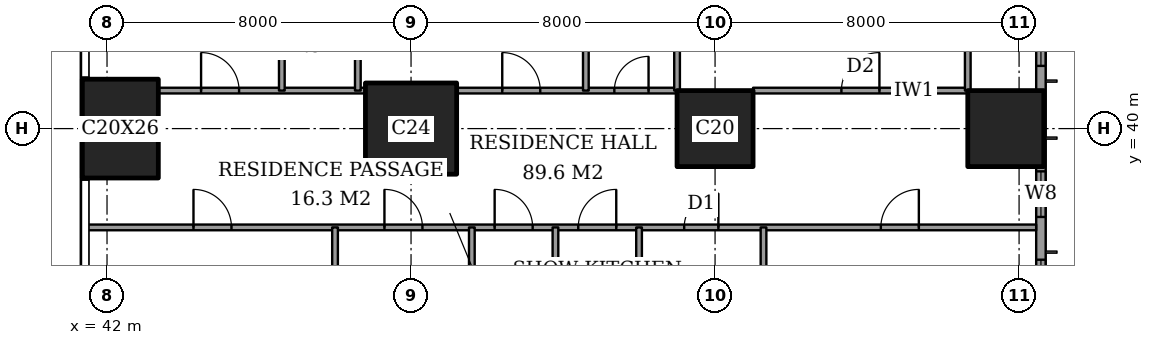
"""IFC4 building model, lengths in metres.
Left out: names, types, materials, properties, quantities, classifications, styles, units other than length and angle.
Written with IfcOpenShell. Run it as: python <this file> out.ifc"""

import sys

from ifc_helpers import new_model, si_unit, direction, frame, frame_2d, origin, origin_2d, place, context, subcontext, project, spatial, rectangle, extrude, element, fill, save


model = new_model("IFC4")
c1 = context("Model", 3, precision=1e-05, world=origin(), true_north=direction((0.0, 1.0)))
c2 = subcontext(c1, "Body", "Model", "MODEL_VIEW")
j1 = project(units=[si_unit("LENGTHUNIT", "METRE"), si_unit("PLANEANGLEUNIT", "RADIAN")], contexts=[c1])
p1 = place(None, origin())
s1 = spatial("IfcSite", under=j1, at=p1, CompositionType="ELEMENT")
p2 = place(p1, origin())
s2 = spatial("IfcBuilding", under=s1, at=p2, CompositionType="ELEMENT")
p3 = place(p2, frame((0.0, 0.0, 87.2)))
s3 = spatial("IfcBuildingStorey", under=s2, at=p3, CompositionType="ELEMENT", Elevation=87.2)
p4 = place(p3, frame((42.35, 40.0, 0.0), z_axis=(0.0, 0.0, 1.0), x_axis=(1.0, 0.0, 0.0)))
e1 = element("IfcColumn", 1, at=p4, inside=s3, PredefinedType="COLUMN", context=c2, shape_type="SweptSolid", body=[
    extrude(rectangle(XDim=2.0, YDim=2.6, at=origin_2d()), origin(), (0.0, 0.0, 1.0), 3.6),
])
p5 = place(p3, frame((50.0, 40.0, 0.0), z_axis=(0.0, 0.0, 1.0), x_axis=(1.0, 0.0, 0.0)))
e2 = element("IfcColumn", 2, at=p5, inside=s3, PredefinedType="COLUMN", context=c2, shape_type="SweptSolid", body=[
    extrude(rectangle(XDim=2.4, YDim=2.4, at=origin_2d()), origin(), (0.0, 0.0, 1.0), 3.6),
])
for number, where, z_axis, x_axis in (
    (3, (58.0, 40.0, 0.0), (0.0, 0.0, 1.0), (1.0, 0.0, 0.0)),
    (4, (65.65, 40.0, 0.0), (0.0, 0.0, 1.0), (1.0, 0.0, 0.0)),
):
    element("IfcColumn", number, at=place(p3, frame(where, z_axis=z_axis, x_axis=x_axis)), inside=s3, PredefinedType="COLUMN", context=c2, shape_type="SweptSolid", body=[
        extrude(rectangle(XDim=2.0, YDim=2.0, at=origin_2d()), origin(), (0.0, 0.0, 1.0), 3.6),
    ])
p6 = place(p3, frame((66.575, 3.175, 0.0), z_axis=(0.0, 0.0, 1.0), x_axis=(0.0, 1.0, 0.0)))
e5 = element("IfcWall", 5, at=p6, inside=s3, PredefinedType="SOLIDWALL", context=c2, shape_type="SweptSolid", body=[
    extrude(rectangle(XDim=41.65, YDim=0.25, at=frame_2d((20.825, 0.0))), origin(), (0.0, 0.0, 1.0), 3.6),
])
p7 = place(p6, frame((0.775, 0.0, 0.6)))
e6 = element("IfcOpeningElement", 6, at=p7, cuts=e5, PredefinedType="OPENING", context=c2, shape_type="SweptSolid", body=[
    extrude(rectangle(XDim=2.4, YDim=2.0, at=frame_2d((1.2, 1.0))), frame((0.0, 0.135, 0.0), z_axis=(0.0, -1.0, 0.0), x_axis=(1.0, 0.0, 0.0)), (0.0, 0.0, 1.0), 0.27),
])
p8 = place(p6, frame((6.1, 0.0, 0.6)))
e7 = element("IfcOpeningElement", 7, at=p8, cuts=e5, PredefinedType="OPENING", context=c2, shape_type="SweptSolid", body=[
    extrude(rectangle(XDim=1.2, YDim=2.0, at=frame_2d((0.6, 1.0))), frame((0.0, 0.135, 0.0), z_axis=(0.0, -1.0, 0.0), x_axis=(1.0, 0.0, 0.0)), (0.0, 0.0, 1.0), 0.27),
])
p9 = place(p6, frame((8.275, 0.0, 0.6)))
e8 = element("IfcOpeningElement", 8, at=p9, cuts=e5, PredefinedType="OPENING", context=c2, shape_type="SweptSolid", body=[
    extrude(rectangle(XDim=2.4, YDim=2.0, at=frame_2d((1.2, 1.0))), frame((0.0, 0.135, 0.0), z_axis=(0.0, -1.0, 0.0), x_axis=(1.0, 0.0, 0.0)), (0.0, 0.0, 1.0), 0.27),
])
p10 = place(p6, frame((15.775, 0.0, 0.6)))
e9 = element("IfcOpeningElement", 9, at=p10, cuts=e5, PredefinedType="OPENING", context=c2, shape_type="SweptSolid", body=[
    extrude(rectangle(XDim=2.4, YDim=2.0, at=frame_2d((1.2, 1.0))), frame((0.0, 0.135, 0.0), z_axis=(0.0, -1.0, 0.0), x_axis=(1.0, 0.0, 0.0)), (0.0, 0.0, 1.0), 0.27),
])
p11 = place(p6, frame((23.475, 0.0, 0.6)))
e10 = element("IfcOpeningElement", 10, at=p11, cuts=e5, PredefinedType="OPENING", context=c2, shape_type="SweptSolid", body=[
    extrude(rectangle(XDim=2.4, YDim=2.0, at=frame_2d((1.2, 1.0))), frame((0.0, 0.135, 0.0), z_axis=(0.0, -1.0, 0.0), x_axis=(1.0, 0.0, 0.0)), (0.0, 0.0, 1.0), 0.27),
])
p12 = place(p6, frame((30.975, 0.0, 0.6)))
e11 = element("IfcOpeningElement", 11, at=p12, cuts=e5, PredefinedType="OPENING", context=c2, shape_type="SweptSolid", body=[
    extrude(rectangle(XDim=2.4, YDim=2.0, at=frame_2d((1.2, 1.0))), frame((0.0, 0.135, 0.0), z_axis=(0.0, -1.0, 0.0), x_axis=(1.0, 0.0, 0.0)), (0.0, 0.0, 1.0), 0.27),
])
p13 = place(p6, frame((34.5, 0.0, 0.6)))
e12 = element("IfcOpeningElement", 12, at=p13, cuts=e5, PredefinedType="OPENING", context=c2, shape_type="SweptSolid", body=[
    extrude(rectangle(XDim=1.2, YDim=2.0, at=frame_2d((0.6, 1.0))), frame((0.0, 0.135, 0.0), z_axis=(0.0, -1.0, 0.0), x_axis=(1.0, 0.0, 0.0)), (0.0, 0.0, 1.0), 0.27),
])
p14 = place(p6, frame((38.475, 0.0, 0.6)))
e13 = element("IfcOpeningElement", 13, at=p14, cuts=e5, PredefinedType="OPENING", context=c2, shape_type="SweptSolid", body=[
    extrude(rectangle(XDim=2.4, YDim=2.0, at=frame_2d((1.2, 1.0))), frame((0.0, 0.135, 0.0), z_axis=(0.0, -1.0, 0.0), x_axis=(1.0, 0.0, 0.0)), (0.0, 0.0, 1.0), 0.27),
])
p15 = place(p3, frame((41.439, 37.4, 0.0), z_axis=(0.0, 0.0, 1.0), x_axis=(1.0, 0.0, 0.0)))
e14 = element("IfcWall", 14, at=p15, inside=s3, PredefinedType="PARTITIONING", context=c2, shape_type="SweptSolid", body=[
    extrude(rectangle(XDim=25.011, YDim=0.15, at=frame_2d((12.505, 0.0))), origin(), (0.0, 0.0, 1.0), 3.25),
])
p16 = place(p15, frame((10.761, 0.0, 0.0)))
e15 = element("IfcOpeningElement", 15, at=p16, cuts=e14, PredefinedType="OPENING", context=c2, shape_type="SweptSolid", body=[
    extrude(rectangle(XDim=1.0, YDim=2.1, at=frame_2d((0.5, 1.05))), frame((0.0, 0.085, 0.0), z_axis=(0.0, -1.0, 0.0), x_axis=(1.0, 0.0, 0.0)), (0.0, 0.0, 1.0), 0.17),
])
p17 = place(p15, frame((20.924, 0.0, 0.0)))
e16 = element("IfcOpeningElement", 16, at=p17, cuts=e14, PredefinedType="OPENING", context=c2, shape_type="SweptSolid", body=[
    extrude(rectangle(XDim=1.0, YDim=2.1, at=frame_2d((0.5, 1.05))), frame((0.0, 0.085, 0.0), z_axis=(0.0, -1.0, 0.0), x_axis=(1.0, 0.0, 0.0)), (0.0, 0.0, 1.0), 0.17),
])
p18 = place(p15, frame((15.749, 0.0, 0.0)))
e17 = element("IfcOpeningElement", 17, at=p18, cuts=e14, PredefinedType="OPENING", context=c2, shape_type="SweptSolid", body=[
    extrude(rectangle(XDim=0.9, YDim=2.1, at=frame_2d((0.45, 1.05))), frame((0.0, 0.085, 0.0), z_axis=(0.0, -1.0, 0.0), x_axis=(1.0, 0.0, 0.0)), (0.0, 0.0, 1.0), 0.17),
])
p19 = place(p15, frame((12.961, 0.0, 0.0)))
e18 = element("IfcOpeningElement", 18, at=p19, cuts=e14, PredefinedType="OPENING", context=c2, shape_type="SweptSolid", body=[
    extrude(rectangle(XDim=1.0, YDim=2.1, at=frame_2d((0.5, 1.05))), frame((0.0, 0.085, 0.0), z_axis=(0.0, -1.0, 0.0), x_axis=(1.0, 0.0, 0.0)), (0.0, 0.0, 1.0), 0.17),
])
p20 = place(p15, frame((7.861, 0.0, 0.0)))
e19 = element("IfcOpeningElement", 19, at=p20, cuts=e14, PredefinedType="OPENING", context=c2, shape_type="SweptSolid", body=[
    extrude(rectangle(XDim=1.0, YDim=2.1, at=frame_2d((0.5, 1.05))), frame((0.0, 0.085, 0.0), z_axis=(0.0, -1.0, 0.0), x_axis=(1.0, 0.0, 0.0)), (0.0, 0.0, 1.0), 0.17),
])
p21 = place(p15, frame((2.836, 0.0, 0.0)))
e20 = element("IfcOpeningElement", 20, at=p21, cuts=e14, PredefinedType="OPENING", context=c2, shape_type="SweptSolid", body=[
    extrude(rectangle(XDim=1.0, YDim=2.1, at=frame_2d((0.5, 1.05))), frame((0.0, 0.085, 0.0), z_axis=(0.0, -1.0, 0.0), x_axis=(1.0, 0.0, 0.0)), (0.0, 0.0, 1.0), 0.17),
])
p22 = place(p3, frame((43.35, 41.0, 0.0), z_axis=(0.0, 0.0, 1.0), x_axis=(1.0, 0.0, 0.0)))
e21 = element("IfcWall", 21, at=p22, inside=s3, PredefinedType="PARTITIONING", context=c2, shape_type="SweptSolid", body=[
    extrude(rectangle(XDim=5.45, YDim=0.15, at=frame_2d((2.725, 0.0))), origin(), (0.0, 0.0, 1.0), 3.25),
])
p23 = place(p22, frame((1.125, 0.0, 0.0)))
e22 = element("IfcOpeningElement", 22, at=p23, cuts=e21, PredefinedType="OPENING", context=c2, shape_type="SweptSolid", body=[
    extrude(rectangle(XDim=1.0, YDim=2.1, at=frame_2d((0.5, 1.05))), frame((0.0, 0.085, 0.0), z_axis=(0.0, -1.0, 0.0), x_axis=(1.0, 0.0, 0.0)), (0.0, 0.0, 1.0), 0.17),
])
p24 = place(p3, frame((51.2, 41.0, 0.0), z_axis=(0.0, 0.0, 1.0), x_axis=(1.0, 0.0, 0.0)))
e23 = element("IfcWall", 23, at=p24, inside=s3, PredefinedType="PARTITIONING", context=c2, shape_type="SweptSolid", body=[
    extrude(rectangle(XDim=5.8, YDim=0.15, at=frame_2d((2.9, 0.0))), origin(), (0.0, 0.0, 1.0), 3.25),
])
p25 = place(p24, frame((4.15, 0.0, 0.0)))
e24 = element("IfcOpeningElement", 24, at=p25, cuts=e23, PredefinedType="OPENING", context=c2, shape_type="SweptSolid", body=[
    extrude(rectangle(XDim=0.9, YDim=2.1, at=frame_2d((0.45, 1.05))), frame((0.0, 0.085, 0.0), z_axis=(0.0, -1.0, 0.0), x_axis=(1.0, 0.0, 0.0)), (0.0, 0.0, 1.0), 0.17),
])
p26 = place(p24, frame((1.2, 0.0, 0.0)))
e25 = element("IfcOpeningElement", 25, at=p26, cuts=e23, PredefinedType="OPENING", context=c2, shape_type="SweptSolid", body=[
    extrude(rectangle(XDim=1.0, YDim=2.1, at=frame_2d((0.5, 1.05))), frame((0.0, 0.085, 0.0), z_axis=(0.0, -1.0, 0.0), x_axis=(1.0, 0.0, 0.0)), (0.0, 0.0, 1.0), 0.17),
])
p27 = place(p3, frame((59.0, 41.0, 0.0), z_axis=(0.0, 0.0, 1.0), x_axis=(1.0, 0.0, 0.0)))
e26 = element("IfcWall", 26, at=p27, inside=s3, PredefinedType="PARTITIONING", context=c2, shape_type="SweptSolid", body=[
    extrude(rectangle(XDim=5.65, YDim=0.15, at=frame_2d((2.825, 0.0))), origin(), (0.0, 0.0, 1.0), 3.25),
])
p28 = place(p27, frame((2.325, 0.0, 0.0)))
e27 = element("IfcOpeningElement", 27, at=p28, cuts=e26, PredefinedType="OPENING", context=c2, shape_type="SweptSolid", body=[
    extrude(rectangle(XDim=1.0, YDim=2.1, at=frame_2d((0.5, 1.05))), frame((0.0, 0.085, 0.0), z_axis=(0.0, -1.0, 0.0), x_axis=(1.0, 0.0, 0.0)), (0.0, 0.0, 1.0), 0.17),
])
p29 = place(p3, frame((46.6, 41.0, 0.0), z_axis=(0.0, 0.0, 1.0), x_axis=(0.0, 1.0, 0.0)))
e28 = element("IfcWall", 28, at=p29, inside=s3, PredefinedType="PARTITIONING", context=c2, shape_type="SweptSolid", body=[
    extrude(rectangle(XDim=7.45, YDim=0.15, at=frame_2d((3.725, 0.0))), origin(), (0.0, 0.0, 1.0), 3.25),
])
p30 = place(p29, frame((3.275, 0.0, 0.0)))
e29 = element("IfcOpeningElement", 29, at=p30, cuts=e28, PredefinedType="OPENING", context=c2, shape_type="SweptSolid", body=[
    extrude(rectangle(XDim=0.9, YDim=2.1, at=frame_2d((0.45, 1.05))), frame((0.0, 0.085, 0.0), z_axis=(0.0, -1.0, 0.0), x_axis=(1.0, 0.0, 0.0)), (0.0, 0.0, 1.0), 0.17),
])
p31 = place(p3, frame((48.0, 28.0, 0.0), z_axis=(0.0, 0.0, 1.0), x_axis=(0.0, 1.0, 0.0)))
e30 = element("IfcWall", 30, at=p31, inside=s3, PredefinedType="PARTITIONING", context=c2, shape_type="SweptSolid", body=[
    extrude(rectangle(XDim=9.4, YDim=0.15, at=frame_2d((4.7, 0.0))), origin(), (0.0, 0.0, 1.0), 3.25),
])
p32 = place(p31, frame((0.55, 0.0, 0.0)))
e31 = element("IfcOpeningElement", 31, at=p32, cuts=e30, PredefinedType="OPENING", context=c2, shape_type="SweptSolid", body=[
    extrude(rectangle(XDim=0.9, YDim=2.1, at=frame_2d((0.45, 1.05))), frame((0.0, 0.085, 0.0), z_axis=(0.0, -1.0, 0.0), x_axis=(1.0, 0.0, 0.0)), (0.0, 0.0, 1.0), 0.17),
])
p33 = place(p3, frame((48.6, 41.0, 0.0), z_axis=(0.0, 0.0, 1.0), x_axis=(0.0, 1.0, 0.0)))
e32 = element("IfcWall", 32, at=p33, inside=s3, PredefinedType="PARTITIONING", context=c2, shape_type="SweptSolid", body=[
    extrude(rectangle(XDim=7.45, YDim=0.15, at=frame_2d((3.725, 0.0))), origin(), (0.0, 0.0, 1.0), 3.25),
])
for number, where, z_axis, x_axis in (
    (33, (51.6, 30.0, 0.0), (0.0, 0.0, 1.0), (0.0, 1.0, 0.0)),
    (34, (53.8, 30.0, 0.0), (0.0, 0.0, 1.0), (0.0, 1.0, 0.0)),
):
    element("IfcWall", number, at=place(p3, frame(where, z_axis=z_axis, x_axis=x_axis)), inside=s3, PredefinedType="PARTITIONING", context=c2, shape_type="SweptSolid", body=[
        extrude(rectangle(XDim=7.4, YDim=0.15, at=frame_2d((3.7, 0.0))), origin(), (0.0, 0.0, 1.0), 3.25),
    ])
p34 = place(p3, frame((54.6, 41.0, 0.0), z_axis=(0.0, 0.0, 1.0), x_axis=(0.0, 1.0, 0.0)))
e35 = element("IfcWall", 35, at=p34, inside=s3, PredefinedType="PARTITIONING", context=c2, shape_type="SweptSolid", body=[
    extrude(rectangle(XDim=7.45, YDim=0.15, at=frame_2d((3.725, 0.0))), origin(), (0.0, 0.0, 1.0), 3.25),
])
p35 = place(p3, frame((56.0, 28.0, 0.0), z_axis=(0.0, 0.0, 1.0), x_axis=(0.0, 1.0, 0.0)))
e36 = element("IfcWall", 36, at=p35, inside=s3, PredefinedType="PARTITIONING", context=c2, shape_type="SweptSolid", body=[
    extrude(rectangle(XDim=9.4, YDim=0.15, at=frame_2d((4.7, 0.0))), origin(), (0.0, 0.0, 1.0), 3.25),
])
p36 = place(p35, frame((0.5, 0.0, 0.0)))
e37 = element("IfcOpeningElement", 37, at=p36, cuts=e36, PredefinedType="OPENING", context=c2, shape_type="SweptSolid", body=[
    extrude(rectangle(XDim=1.0, YDim=2.1, at=frame_2d((0.5, 1.05))), frame((0.0, 0.085, 0.0), z_axis=(0.0, -1.0, 0.0), x_axis=(1.0, 0.0, 0.0)), (0.0, 0.0, 1.0), 0.17),
])
p37 = place(p3, frame((57.0, 41.0, 0.0), z_axis=(0.0, 0.0, 1.0), x_axis=(0.0, 1.0, 0.0)))
e38 = element("IfcWall", 38, at=p37, inside=s3, PredefinedType="PARTITIONING", context=c2, shape_type="SweptSolid", body=[
    extrude(rectangle(XDim=5.65, YDim=0.15, at=frame_2d((2.825, 0.0))), origin(), (0.0, 0.0, 1.0), 3.25),
])
p38 = place(p3, frame((59.275, 33.2, 0.0), z_axis=(0.0, 0.0, 1.0), x_axis=(0.0, 1.0, 0.0)))
e39 = element("IfcWall", 39, at=p38, inside=s3, PredefinedType="PARTITIONING", context=c2, shape_type="SweptSolid", body=[
    extrude(rectangle(XDim=4.2, YDim=0.15, at=frame_2d((2.1, 0.0))), origin(), (0.0, 0.0, 1.0), 3.25),
])
p39 = place(p3, frame((64.65, 41.0, 0.0), z_axis=(0.0, 0.0, 1.0), x_axis=(0.0, 1.0, 0.0)))
e40 = element("IfcWall", 40, at=p39, inside=s3, PredefinedType="PARTITIONING", context=c2, shape_type="SweptSolid", body=[
    extrude(rectangle(XDim=3.7, YDim=0.15, at=frame_2d((1.85, 0.0))), origin(), (0.0, 0.0, 1.0), 3.25),
])
p40 = place(p39, frame((1.4, 0.0, 0.0)))
e41 = element("IfcOpeningElement", 41, at=p40, cuts=e40, PredefinedType="OPENING", context=c2, shape_type="SweptSolid", body=[
    extrude(rectangle(XDim=0.9, YDim=2.1, at=frame_2d((0.45, 1.05))), frame((0.0, 0.085, 0.0), z_axis=(0.0, -1.0, 0.0), x_axis=(1.0, 0.0, 0.0)), (0.0, 0.0, 1.0), 0.17),
])
p41 = place(p12, origin())
e42 = element("IfcWindow", 42, at=p41, inside=s3, PartitioningType="SINGLE_PANEL", PredefinedType="WINDOW", context=c2, shape_type="SweptSolid", body=[
    extrude(rectangle(XDim=2.4, YDim=2.0, at=frame_2d((1.2, 1.0))), frame((0.0, 0.03, 0.0), z_axis=(0.0, -1.0, 0.0), x_axis=(1.0, 0.0, 0.0)), (0.0, 0.0, 1.0), 0.06),
])
fill(e11, e42)
p42 = place(p13, origin())
e43 = element("IfcWindow", 43, at=p42, inside=s3, PartitioningType="SINGLE_PANEL", PredefinedType="WINDOW", context=c2, shape_type="SweptSolid", body=[
    extrude(rectangle(XDim=1.2, YDim=2.0, at=frame_2d((0.6, 1.0))), frame((0.0, 0.03, 0.0), z_axis=(0.0, -1.0, 0.0), x_axis=(1.0, 0.0, 0.0)), (0.0, 0.0, 1.0), 0.06),
])
fill(e12, e43)
p43 = place(p14, origin())
e44 = element("IfcWindow", 44, at=p43, inside=s3, PartitioningType="SINGLE_PANEL", PredefinedType="WINDOW", context=c2, shape_type="SweptSolid", body=[
    extrude(rectangle(XDim=2.4, YDim=2.0, at=frame_2d((1.2, 1.0))), frame((0.0, 0.03, 0.0), z_axis=(0.0, -1.0, 0.0), x_axis=(1.0, 0.0, 0.0)), (0.0, 0.0, 1.0), 0.06),
])
fill(e13, e44)
p44 = place(p28, origin())
e45 = element("IfcDoor", 45, at=p44, inside=s3, OperationType="SINGLE_SWING_LEFT", PredefinedType="DOOR", context=c2, shape_type="SweptSolid", body=[
    extrude(rectangle(XDim=1.0, YDim=2.1, at=frame_2d((0.5, 1.05))), frame((0.0, 0.025, 0.0), z_axis=(0.0, -1.0, 0.0), x_axis=(1.0, 0.0, 0.0)), (0.0, 0.0, 1.0), 0.05),
])
fill(e27, e45)
p45 = place(p25, origin())
e46 = element("IfcDoor", 46, at=p45, inside=s3, OperationType="SINGLE_SWING_LEFT", PredefinedType="DOOR", context=c2, shape_type="SweptSolid", body=[
    extrude(rectangle(XDim=0.9, YDim=2.1, at=frame_2d((0.45, 1.05))), frame((0.0, 0.025, 0.0), z_axis=(0.0, -1.0, 0.0), x_axis=(1.0, 0.0, 0.0)), (0.0, 0.0, 1.0), 0.05),
])
fill(e24, e46)
p46 = place(p26, origin())
e47 = element("IfcDoor", 47, at=p46, inside=s3, OperationType="SINGLE_SWING_RIGHT", PredefinedType="DOOR", context=c2, shape_type="SweptSolid", body=[
    extrude(rectangle(XDim=1.0, YDim=2.1, at=frame_2d((0.5, 1.05))), frame((0.0, 0.025, 0.0), z_axis=(0.0, -1.0, 0.0), x_axis=(1.0, 0.0, 0.0)), (0.0, 0.0, 1.0), 0.05),
])
fill(e25, e47)
p47 = place(p23, origin())
e48 = element("IfcDoor", 48, at=p47, inside=s3, OperationType="SINGLE_SWING_RIGHT", PredefinedType="DOOR", context=c2, shape_type="SweptSolid", body=[
    extrude(rectangle(XDim=1.0, YDim=2.1, at=frame_2d((0.5, 1.05))), frame((0.0, 0.025, 0.0), z_axis=(0.0, -1.0, 0.0), x_axis=(1.0, 0.0, 0.0)), (0.0, 0.0, 1.0), 0.05),
])
fill(e22, e48)
p48 = place(p16, origin())
e49 = element("IfcDoor", 49, at=p48, inside=s3, OperationType="SINGLE_SWING_RIGHT", PredefinedType="DOOR", context=c2, shape_type="SweptSolid", body=[
    extrude(rectangle(XDim=1.0, YDim=2.1, at=frame_2d((0.5, 1.05))), frame((0.0, 0.025, 0.0), z_axis=(0.0, -1.0, 0.0), x_axis=(1.0, 0.0, 0.0)), (0.0, 0.0, 1.0), 0.05),
])
fill(e15, e49)
p49 = place(p17, origin())
e50 = element("IfcDoor", 50, at=p49, inside=s3, OperationType="SINGLE_SWING_LEFT", PredefinedType="DOOR", context=c2, shape_type="SweptSolid", body=[
    extrude(rectangle(XDim=1.0, YDim=2.1, at=frame_2d((0.5, 1.05))), frame((0.0, 0.025, 0.0), z_axis=(0.0, -1.0, 0.0), x_axis=(1.0, 0.0, 0.0)), (0.0, 0.0, 1.0), 0.05),
])
fill(e16, e50)
p50 = place(p18, origin())
e51 = element("IfcDoor", 51, at=p50, inside=s3, OperationType="SINGLE_SWING_LEFT", PredefinedType="DOOR", context=c2, shape_type="SweptSolid", body=[
    extrude(rectangle(XDim=0.9, YDim=2.1, at=frame_2d((0.45, 1.05))), frame((0.0, 0.025, 0.0), z_axis=(0.0, -1.0, 0.0), x_axis=(1.0, 0.0, 0.0)), (0.0, 0.0, 1.0), 0.05),
])
fill(e17, e51)
p51 = place(p19, origin())
e52 = element("IfcDoor", 52, at=p51, inside=s3, OperationType="SINGLE_SWING_LEFT", PredefinedType="DOOR", context=c2, shape_type="SweptSolid", body=[
    extrude(rectangle(XDim=1.0, YDim=2.1, at=frame_2d((0.5, 1.05))), frame((0.0, 0.025, 0.0), z_axis=(0.0, -1.0, 0.0), x_axis=(1.0, 0.0, 0.0)), (0.0, 0.0, 1.0), 0.05),
])
fill(e18, e52)
p52 = place(p20, origin())
e53 = element("IfcDoor", 53, at=p52, inside=s3, OperationType="SINGLE_SWING_RIGHT", PredefinedType="DOOR", context=c2, shape_type="SweptSolid", body=[
    extrude(rectangle(XDim=1.0, YDim=2.1, at=frame_2d((0.5, 1.05))), frame((0.0, 0.025, 0.0), z_axis=(0.0, -1.0, 0.0), x_axis=(1.0, 0.0, 0.0)), (0.0, 0.0, 1.0), 0.05),
])
fill(e19, e53)
p53 = place(p21, origin())
e54 = element("IfcDoor", 54, at=p53, inside=s3, OperationType="SINGLE_SWING_RIGHT", PredefinedType="DOOR", context=c2, shape_type="SweptSolid", body=[
    extrude(rectangle(XDim=1.0, YDim=2.1, at=frame_2d((0.5, 1.05))), frame((0.0, 0.025, 0.0), z_axis=(0.0, -1.0, 0.0), x_axis=(1.0, 0.0, 0.0)), (0.0, 0.0, 1.0), 0.05),
])
fill(e20, e54)
save(model, sys.argv[1])
